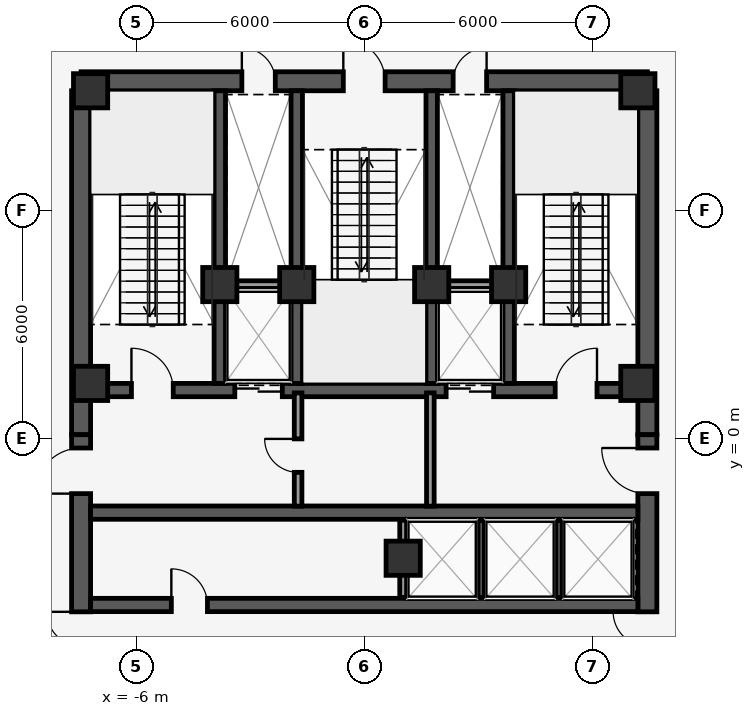
"""IFC4 building model, lengths in metres.
Left out: names, types, materials, properties, quantities, classifications, styles, units other than length and angle.
Written with IfcOpenShell. Run it as: python <this file> out.ifc"""

import sys

from ifc_helpers import new_model, si_unit, direction, frame, frame_2d, origin, origin_2d, place, context, subcontext, project, spatial, rectangle, extrude, element, fill, save


model = new_model("IFC4")
c1 = context("Model", 3, precision=1e-05, world=origin(), true_north=direction((0.0, 1.0)))
c2 = subcontext(c1, "Body", "Model", "MODEL_VIEW")
j1 = project(units=[si_unit("LENGTHUNIT", "METRE"), si_unit("PLANEANGLEUNIT", "RADIAN")], contexts=[c1])
p1 = place(None, origin())
s1 = spatial("IfcSite", under=j1, at=p1, CompositionType="ELEMENT")
p2 = place(p1, origin())
s2 = spatial("IfcBuilding", under=s1, at=p2, CompositionType="ELEMENT")
p3 = place(p2, frame((0.0, 0.0, 318.8)))
s3 = spatial("IfcBuildingStorey", under=s2, at=p3, CompositionType="ELEMENT", Elevation=318.8)
p4 = place(p3, frame((-7.45, 9.4, 0.0), z_axis=(0.0, 0.0, 1.0), x_axis=(1.0, 0.0, 0.0)))
e1 = element("IfcWall", 1, at=p4, inside=s3, PredefinedType="SHEAR", context=c2, shape_type="SweptSolid", body=[
    extrude(rectangle(XDim=14.9, YDim=0.5, at=frame_2d((7.45, 0.0))), origin(), (0.0, 0.0, 1.0), 4.32),
])
p5 = place(p4, frame((6.9, 0.0, 0.0)))
e2 = element("IfcOpeningElement", 2, at=p5, cuts=e1, PredefinedType="OPENING", context=c2, shape_type="SweptSolid", body=[
    extrude(rectangle(XDim=1.1, YDim=2.15, at=frame_2d((0.55, 1.075))), frame((0.0, 0.26, 0.0), z_axis=(0.0, -1.0, 0.0), x_axis=(1.0, 0.0, 0.0)), (0.0, 0.0, 1.0), 0.52),
])
p6 = place(p4, frame((4.23, 0.0, 0.0)))
e3 = element("IfcOpeningElement", 3, at=p6, cuts=e1, PredefinedType="OPENING", context=c2, shape_type="SweptSolid", body=[
    extrude(rectangle(XDim=0.88, YDim=2.15, at=frame_2d((0.44, 1.075))), frame((0.0, 0.26, 0.0), z_axis=(0.0, -1.0, 0.0), x_axis=(1.0, 0.0, 0.0)), (0.0, 0.0, 1.0), 0.52),
])
p7 = place(p4, frame((9.79, 0.0, 0.0)))
e4 = element("IfcOpeningElement", 4, at=p7, cuts=e1, PredefinedType="OPENING", context=c2, shape_type="SweptSolid", body=[
    extrude(rectangle(XDim=0.88, YDim=2.15, at=frame_2d((0.44, 1.075))), frame((0.0, 0.26, 0.0), z_axis=(0.0, -1.0, 0.0), x_axis=(1.0, 0.0, 0.0)), (0.0, 0.0, 1.0), 0.52),
])
p8 = place(p3, frame((-7.2, 1.275, 0.0), z_axis=(0.0, 0.0, 1.0), x_axis=(1.0, 0.0, 0.0)))
e5 = element("IfcWall", 5, at=p8, inside=s3, PredefinedType="SHEAR", context=c2, shape_type="SweptSolid", body=[
    extrude(rectangle(XDim=14.4, YDim=0.35, at=frame_2d((7.2, 0.0))), origin(), (0.0, 0.0, 1.0), 4.32),
])
p9 = place(p8, frame((3.795, 0.0, 0.0)))
e6 = element("IfcOpeningElement", 6, at=p9, cuts=e5, PredefinedType="OPENING", context=c2, shape_type="SweptSolid", body=[
    extrude(rectangle(XDim=1.25, YDim=2.25, at=frame_2d((0.625, 1.125))), frame((0.0, 0.185, 0.0), z_axis=(0.0, -1.0, 0.0), x_axis=(1.0, 0.0, 0.0)), (0.0, 0.0, 1.0), 0.37),
])
p10 = place(p8, frame((9.355, 0.0, 0.0)))
e7 = element("IfcOpeningElement", 7, at=p10, cuts=e5, PredefinedType="OPENING", context=c2, shape_type="SweptSolid", body=[
    extrude(rectangle(XDim=1.25, YDim=2.25, at=frame_2d((0.625, 1.125))), frame((0.0, 0.185, 0.0), z_axis=(0.0, -1.0, 0.0), x_axis=(1.0, 0.0, 0.0)), (0.0, 0.0, 1.0), 0.37),
])
p11 = place(p8, frame((1.075, 0.0, 0.0)))
e8 = element("IfcOpeningElement", 8, at=p11, cuts=e5, PredefinedType="OPENING", context=c2, shape_type="SweptSolid", body=[
    extrude(rectangle(XDim=1.1, YDim=2.15, at=frame_2d((0.55, 1.075))), frame((0.0, 0.185, 0.0), z_axis=(0.0, -1.0, 0.0), x_axis=(1.0, 0.0, 0.0)), (0.0, 0.0, 1.0), 0.37),
])
p12 = place(p8, frame((12.225, 0.0, 0.0)))
e9 = element("IfcOpeningElement", 9, at=p12, cuts=e5, PredefinedType="OPENING", context=c2, shape_type="SweptSolid", body=[
    extrude(rectangle(XDim=1.1, YDim=2.15, at=frame_2d((0.55, 1.075))), frame((0.0, 0.185, 0.0), z_axis=(0.0, -1.0, 0.0), x_axis=(1.0, 0.0, 0.0)), (0.0, 0.0, 1.0), 0.37),
])
for number, where, z_axis, x_axis in (
    (10, (-3.8, 1.45, 0.0), (0.0, 0.0, 1.0), (0.0, 1.0, 0.0)),
    (11, (-1.775, 1.45, 0.0), (0.0, 0.0, 1.0), (0.0, 1.0, 0.0)),
    (12, (1.775, 1.45, 0.0), (0.0, 0.0, 1.0), (0.0, 1.0, 0.0)),
    (13, (3.8, 1.45, 0.0), (0.0, 0.0, 1.0), (0.0, 1.0, 0.0)),
):
    element("IfcWall", number, at=place(p3, frame(where, z_axis=z_axis, x_axis=x_axis)), inside=s3, PredefinedType="SHEAR", context=c2, shape_type="SweptSolid", body=[
        extrude(rectangle(XDim=7.7, YDim=0.3, at=frame_2d((3.85, 0.0))), origin(), (0.0, 0.0, 1.0), 4.32),
    ])
for number, where, z_axis, x_axis in (
    (14, (-7.45, 0.1, 0.0), (0.0, 0.0, 1.0), (0.0, 1.0, 0.0)),
    (15, (7.45, 0.1, 0.0), (0.0, 0.0, 1.0), (0.0, 1.0, 0.0)),
):
    element("IfcWall", number, at=place(p3, frame(where, z_axis=z_axis, x_axis=x_axis)), inside=s3, PredefinedType="SHEAR", context=c2, shape_type="SweptSolid", body=[
        extrude(rectangle(XDim=9.05, YDim=0.5, at=frame_2d((4.525, 0.0))), origin(), (0.0, 0.0, 1.0), 4.32),
    ])
p13 = place(p3, frame((-7.45, -9.0, 0.0), z_axis=(0.0, 0.0, 1.0), x_axis=(0.0, 1.0, 0.0)))
e16 = element("IfcWall", 16, at=p13, inside=s3, PredefinedType="SHEAR", context=c2, shape_type="SweptSolid", body=[
    extrude(rectangle(XDim=9.1, YDim=0.5, at=frame_2d((4.55, 0.0))), origin(), (0.0, 0.0, 1.0), 4.32),
])
p14 = place(p13, frame((2.64, 0.0, 0.0)))
e17 = element("IfcOpeningElement", 17, at=p14, cuts=e16, PredefinedType="OPENING", context=c2, shape_type="SweptSolid", body=[
    extrude(rectangle(XDim=1.8, YDim=2.2, at=frame_2d((0.9, 1.1))), frame((0.0, 0.26, 0.0), z_axis=(0.0, -1.0, 0.0), x_axis=(1.0, 0.0, 0.0)), (0.0, 0.0, 1.0), 0.52),
])
p15 = place(p13, frame((7.55, 0.0, 0.0)))
e18 = element("IfcOpeningElement", 18, at=p15, cuts=e16, PredefinedType="OPENING", context=c2, shape_type="SweptSolid", body=[
    extrude(rectangle(XDim=1.2, YDim=2.15, at=frame_2d((0.6, 1.075))), frame((0.0, 0.26, 0.0), z_axis=(0.0, -1.0, 0.0), x_axis=(1.0, 0.0, 0.0)), (0.0, 0.0, 1.0), 0.52),
])
p16 = place(p3, frame((7.45, -9.0, 0.0), z_axis=(0.0, 0.0, 1.0), x_axis=(0.0, 1.0, 0.0)))
e19 = element("IfcWall", 19, at=p16, inside=s3, PredefinedType="SHEAR", context=c2, shape_type="SweptSolid", body=[
    extrude(rectangle(XDim=9.1, YDim=0.5, at=frame_2d((4.55, 0.0))), origin(), (0.0, 0.0, 1.0), 4.32),
])
p17 = place(p16, frame((2.64, 0.0, 0.0)))
e20 = element("IfcOpeningElement", 20, at=p17, cuts=e19, PredefinedType="OPENING", context=c2, shape_type="SweptSolid", body=[
    extrude(rectangle(XDim=1.8, YDim=2.2, at=frame_2d((0.9, 1.1))), frame((0.0, 0.26, 0.0), z_axis=(0.0, -1.0, 0.0), x_axis=(1.0, 0.0, 0.0)), (0.0, 0.0, 1.0), 0.52),
])
p18 = place(p16, frame((7.55, 0.0, 0.0)))
e21 = element("IfcOpeningElement", 21, at=p18, cuts=e19, PredefinedType="OPENING", context=c2, shape_type="SweptSolid", body=[
    extrude(rectangle(XDim=1.2, YDim=2.15, at=frame_2d((0.6, 1.075))), frame((0.0, 0.26, 0.0), z_axis=(0.0, -1.0, 0.0), x_axis=(1.0, 0.0, 0.0)), (0.0, 0.0, 1.0), 0.52),
])
p19 = place(p3, frame((-7.2, -1.95, 0.0), z_axis=(0.0, 0.0, 1.0), x_axis=(1.0, 0.0, 0.0)))
e22 = element("IfcWall", 22, at=p19, inside=s3, PredefinedType="SHEAR", context=c2, shape_type="SweptSolid", body=[
    extrude(rectangle(XDim=14.4, YDim=0.35, at=frame_2d((7.2, 0.0))), origin(), (0.0, 0.0, 1.0), 4.32),
])
p20 = place(p3, frame((-7.2, -4.38, 0.0), z_axis=(0.0, 0.0, 1.0), x_axis=(1.0, 0.0, 0.0)))
e23 = element("IfcWall", 23, at=p20, inside=s3, PredefinedType="SHEAR", context=c2, shape_type="SweptSolid", body=[
    extrude(rectangle(XDim=14.4, YDim=0.35, at=frame_2d((7.2, 0.0))), origin(), (0.0, 0.0, 1.0), 4.32),
])
p21 = place(p20, frame((2.125, 0.0, 0.0)))
e24 = element("IfcOpeningElement", 24, at=p21, cuts=e23, PredefinedType="OPENING", context=c2, shape_type="SweptSolid", body=[
    extrude(rectangle(XDim=0.95, YDim=2.15, at=frame_2d((0.475, 1.075))), frame((0.0, 0.185, 0.0), z_axis=(0.0, -1.0, 0.0), x_axis=(1.0, 0.0, 0.0)), (0.0, 0.0, 1.0), 0.37),
])
for number, where, z_axis, x_axis in (
    (25, (7.2, 1.45, 0.0), (0.0, 0.0, 1.0), (1.0, 0.0, 0.0)),
    (26, (7.2, 9.15, 0.0), (0.0, 0.0, 1.0), (1.0, 0.0, 0.0)),
    (27, (-7.2, 9.15, 0.0), (0.0, 0.0, 1.0), (1.0, 0.0, 0.0)),
    (28, (-7.2, 1.45, 0.0), (0.0, 0.0, 1.0), (1.0, 0.0, 0.0)),
    (29, (-3.8, 4.05, 0.0), (0.0, 0.0, 1.0), (1.0, 0.0, 0.0)),
    (30, (3.8, 4.05, 0.0), (0.0, 0.0, 1.0), (1.0, 0.0, 0.0)),
    (31, (-1.775, 4.05, 0.0), (0.0, 0.0, 1.0), (1.0, 0.0, 0.0)),
    (32, (1.775, 4.05, 0.0), (0.0, 0.0, 1.0), (1.0, 0.0, 0.0)),
    (33, (1.025, -3.15, 0.0), (0.0, 0.0, 1.0), (1.0, 0.0, 0.0)),
):
    element("IfcColumn", number, at=place(p3, frame(where, z_axis=z_axis, x_axis=x_axis)), inside=s3, PredefinedType="COLUMN", context=c2, shape_type="SweptSolid", body=[
        extrude(rectangle(XDim=0.9, YDim=0.9, at=origin_2d()), origin(), (0.0, 0.0, 1.0), 4.6),
    ])
p22 = place(p3, frame((25.8, 9.083, 0.0), z_axis=(0.0, 0.0, 1.0), x_axis=(-0.55919392155, -0.829036885851, 0.0)))
e34 = element("IfcWall", 34, at=p22, inside=s3, PredefinedType="STANDARD", context=c2, shape_type="SweptSolid", body=[
    extrude(rectangle(XDim=43.915, YDim=0.28, at=frame_2d((21.958, 0.0))), origin(), (0.0, 0.0, 1.0), 4.32),
])
p23 = place(p22, frame((21.457, 0.0, 0.0)))
e35 = element("IfcOpeningElement", 35, at=p23, cuts=e34, PredefinedType="OPENING", context=c2, shape_type="SweptSolid", body=[
    extrude(rectangle(XDim=1.0, YDim=2.15, at=frame_2d((0.5, 1.075))), frame((0.0, 0.15, 0.0), z_axis=(0.0, -1.0, 0.0), x_axis=(1.0, 0.0, 0.0)), (0.0, 0.0, 1.0), 0.3),
])
p24 = place(p22, frame((4.257, 0.0, 0.85)))
e36 = element("IfcOpeningElement", 36, at=p24, cuts=e34, PredefinedType="OPENING", context=c2, shape_type="SweptSolid", body=[
    extrude(rectangle(XDim=1.8, YDim=2.4, at=frame_2d((0.9, 1.2))), frame((0.0, 0.15, 0.0), z_axis=(0.0, -1.0, 0.0), x_axis=(1.0, 0.0, 0.0)), (0.0, 0.0, 1.0), 0.3),
])
p25 = place(p22, frame((9.857, 0.0, 0.85)))
e37 = element("IfcOpeningElement", 37, at=p25, cuts=e34, PredefinedType="OPENING", context=c2, shape_type="SweptSolid", body=[
    extrude(rectangle(XDim=1.8, YDim=2.4, at=frame_2d((0.9, 1.2))), frame((0.0, 0.15, 0.0), z_axis=(0.0, -1.0, 0.0), x_axis=(1.0, 0.0, 0.0)), (0.0, 0.0, 1.0), 0.3),
])
p26 = place(p22, frame((32.257, 0.0, 0.85)))
e38 = element("IfcOpeningElement", 38, at=p26, cuts=e34, PredefinedType="OPENING", context=c2, shape_type="SweptSolid", body=[
    extrude(rectangle(XDim=1.8, YDim=2.4, at=frame_2d((0.9, 1.2))), frame((0.0, 0.15, 0.0), z_axis=(0.0, -1.0, 0.0), x_axis=(1.0, 0.0, 0.0)), (0.0, 0.0, 1.0), 0.3),
])
p27 = place(p22, frame((37.857, 0.0, 0.85)))
e39 = element("IfcOpeningElement", 39, at=p27, cuts=e34, PredefinedType="OPENING", context=c2, shape_type="SweptSolid", body=[
    extrude(rectangle(XDim=1.8, YDim=2.4, at=frame_2d((0.9, 1.2))), frame((0.0, 0.15, 0.0), z_axis=(0.0, -1.0, 0.0), x_axis=(1.0, 0.0, 0.0)), (0.0, 0.0, 1.0), 0.3),
])
p28 = place(p3, frame((-4.988, -26.865, 0.0), z_axis=(0.0, 0.0, 1.0), x_axis=(-0.431592936847, 0.902068476815, 0.0)))
e40 = element("IfcWall", 40, at=p28, inside=s3, PredefinedType="STANDARD", context=c2, shape_type="SweptSolid", body=[
    extrude(rectangle(XDim=43.18, YDim=0.28, at=frame_2d((21.59, 0.0))), origin(), (0.0, 0.0, 1.0), 4.32),
])
p29 = place(p28, frame((18.499, 0.0, 0.0)))
e41 = element("IfcOpeningElement", 41, at=p29, cuts=e40, PredefinedType="OPENING", context=c2, shape_type="SweptSolid", body=[
    extrude(rectangle(XDim=1.0, YDim=2.15, at=frame_2d((0.5, 1.075))), frame((0.0, 0.15, 0.0), z_axis=(0.0, -1.0, 0.0), x_axis=(1.0, 0.0, 0.0)), (0.0, 0.0, 1.0), 0.3),
])
p30 = place(p28, frame((9.49, 0.0, 0.85)))
e42 = element("IfcOpeningElement", 42, at=p30, cuts=e40, PredefinedType="OPENING", context=c2, shape_type="SweptSolid", body=[
    extrude(rectangle(XDim=1.8, YDim=2.4, at=frame_2d((0.9, 1.2))), frame((0.0, 0.15, 0.0), z_axis=(0.0, -1.0, 0.0), x_axis=(1.0, 0.0, 0.0)), (0.0, 0.0, 1.0), 0.3),
])
p31 = place(p28, frame((31.89, 0.0, 0.85)))
e43 = element("IfcOpeningElement", 43, at=p31, cuts=e40, PredefinedType="OPENING", context=c2, shape_type="SweptSolid", body=[
    extrude(rectangle(XDim=1.8, YDim=2.4, at=frame_2d((0.9, 1.2))), frame((0.0, 0.15, 0.0), z_axis=(0.0, -1.0, 0.0), x_axis=(1.0, 0.0, 0.0)), (0.0, 0.0, 1.0), 0.3),
])
p32 = place(p28, frame((37.49, 0.0, 0.85)))
e44 = element("IfcOpeningElement", 44, at=p32, cuts=e40, PredefinedType="OPENING", context=c2, shape_type="SweptSolid", body=[
    extrude(rectangle(XDim=1.8, YDim=2.4, at=frame_2d((0.9, 1.2))), frame((0.0, 0.15, 0.0), z_axis=(0.0, -1.0, 0.0), x_axis=(1.0, 0.0, 0.0)), (0.0, 0.0, 1.0), 0.3),
])
for number, where, z_axis, x_axis in (
    (45, (-3.65, 4.05, 0.0), (0.0, 0.0, 1.0), (1.0, 0.0, 0.0)),
    (46, (1.92, 4.05, 0.0), (0.0, 0.0, 1.0), (1.0, 0.0, 0.0)),
):
    element("IfcWall", number, at=place(p3, frame(where, z_axis=z_axis, x_axis=x_axis)), inside=s3, PredefinedType="PARTITIONING", context=c2, shape_type="SweptSolid", body=[
        extrude(rectangle(XDim=1.73, YDim=0.2, at=frame_2d((0.865, 0.0))), origin(), (0.0, 0.0, 1.0), 4.32),
    ])
p33 = place(p3, frame((1.025, -4.18, 0.0), z_axis=(0.0, 0.0, 1.0), x_axis=(0.0, 1.0, 0.0)))
e47 = element("IfcWall", 47, at=p33, inside=s3, PredefinedType="PARTITIONING", context=c2, shape_type="SweptSolid", body=[
    extrude(rectangle(XDim=2.03, YDim=0.18, at=frame_2d((1.015, 0.0))), origin(), (0.0, 0.0, 1.0), 3.368),
])
for number, where, z_axis, x_axis in (
    (48, (3.075, -4.18, 0.0), (0.0, 0.0, 1.0), (0.0, 1.0, 0.0)),
    (49, (5.125, -4.18, 0.0), (0.0, 0.0, 1.0), (0.0, 1.0, 0.0)),
):
    element("IfcWall", number, at=place(p3, frame(where, z_axis=z_axis, x_axis=x_axis)), inside=s3, PredefinedType="PARTITIONING", context=c2, shape_type="SweptSolid", body=[
        extrude(rectangle(XDim=2.03, YDim=0.15, at=frame_2d((1.015, 0.0))), origin(), (0.0, 0.0, 1.0), 4.32),
    ])
p34 = place(p3, frame((-1.74, -1.78, 0.0), z_axis=(0.0, 0.0, 1.0), x_axis=(0.0, 1.0, 0.0)))
e50 = element("IfcWall", 50, at=p34, inside=s3, PredefinedType="PARTITIONING", context=c2, shape_type="SweptSolid", body=[
    extrude(rectangle(XDim=2.98, YDim=0.2, at=frame_2d((1.49, 0.0))), origin(), (0.0, 0.0, 1.0), 4.32),
])
p35 = place(p34, frame((0.89, 0.0, 0.0)))
e51 = element("IfcOpeningElement", 51, at=p35, cuts=e50, PredefinedType="OPENING", context=c2, shape_type="SweptSolid", body=[
    extrude(rectangle(XDim=0.88, YDim=2.15, at=frame_2d((0.44, 1.075))), frame((0.0, 0.11, 0.0), z_axis=(0.0, -1.0, 0.0), x_axis=(1.0, 0.0, 0.0)), (0.0, 0.0, 1.0), 0.22),
])
p36 = place(p3, frame((1.74, -1.78, 0.0), z_axis=(0.0, 0.0, 1.0), x_axis=(0.0, 1.0, 0.0)))
e52 = element("IfcWall", 52, at=p36, inside=s3, PredefinedType="PARTITIONING", context=c2, shape_type="SweptSolid", body=[
    extrude(rectangle(XDim=2.98, YDim=0.2, at=frame_2d((1.49, 0.0))), origin(), (0.0, 0.0, 1.0), 4.32),
])
p37 = place(p9, origin())
e53 = element("IfcDoor", 53, at=p37, inside=s3, OperationType="DOUBLE_DOOR_SLIDING", PredefinedType="DOOR", context=c2, shape_type="SweptSolid", body=[
    extrude(rectangle(XDim=1.25, YDim=2.25, at=frame_2d((0.625, 1.125))), frame((0.0, 0.025, 0.0), z_axis=(0.0, -1.0, 0.0), x_axis=(1.0, 0.0, 0.0)), (0.0, 0.0, 1.0), 0.05),
])
fill(e6, e53)
p38 = place(p10, origin())
e54 = element("IfcDoor", 54, at=p38, inside=s3, OperationType="DOUBLE_DOOR_SLIDING", PredefinedType="DOOR", context=c2, shape_type="SweptSolid", body=[
    extrude(rectangle(XDim=1.25, YDim=2.25, at=frame_2d((0.625, 1.125))), frame((0.0, 0.025, 0.0), z_axis=(0.0, -1.0, 0.0), x_axis=(1.0, 0.0, 0.0)), (0.0, 0.0, 1.0), 0.05),
])
fill(e7, e54)
p39 = place(p11, origin())
e55 = element("IfcDoor", 55, at=p39, inside=s3, OperationType="SINGLE_SWING_LEFT", PredefinedType="DOOR", context=c2, shape_type="SweptSolid", body=[
    extrude(rectangle(XDim=1.1, YDim=2.15, at=frame_2d((0.55, 1.075))), frame((0.0, 0.025, 0.0), z_axis=(0.0, -1.0, 0.0), x_axis=(1.0, 0.0, 0.0)), (0.0, 0.0, 1.0), 0.05),
])
fill(e8, e55)
p40 = place(p12, origin())
e56 = element("IfcDoor", 56, at=p40, inside=s3, OperationType="SINGLE_SWING_RIGHT", PredefinedType="DOOR", context=c2, shape_type="SweptSolid", body=[
    extrude(rectangle(XDim=1.1, YDim=2.15, at=frame_2d((0.55, 1.075))), frame((0.0, 0.025, 0.0), z_axis=(0.0, -1.0, 0.0), x_axis=(1.0, 0.0, 0.0)), (0.0, 0.0, 1.0), 0.05),
])
fill(e9, e56)
p41 = place(p5, origin())
e57 = element("IfcDoor", 57, at=p41, inside=s3, OperationType="SINGLE_SWING_LEFT", PredefinedType="DOOR", context=c2, shape_type="SweptSolid", body=[
    extrude(rectangle(XDim=1.1, YDim=2.15, at=frame_2d((0.55, 1.075))), frame((0.0, 0.025, 0.0), z_axis=(0.0, -1.0, 0.0), x_axis=(1.0, 0.0, 0.0)), (0.0, 0.0, 1.0), 0.05),
])
fill(e2, e57)
p42 = place(p6, origin())
e58 = element("IfcDoor", 58, at=p42, inside=s3, OperationType="SINGLE_SWING_LEFT", PredefinedType="DOOR", context=c2, shape_type="SweptSolid", body=[
    extrude(rectangle(XDim=0.88, YDim=2.15, at=frame_2d((0.44, 1.075))), frame((0.0, 0.025, 0.0), z_axis=(0.0, -1.0, 0.0), x_axis=(1.0, 0.0, 0.0)), (0.0, 0.0, 1.0), 0.05),
])
fill(e3, e58)
p43 = place(p7, origin())
e59 = element("IfcDoor", 59, at=p43, inside=s3, OperationType="SINGLE_SWING_RIGHT", PredefinedType="DOOR", context=c2, shape_type="SweptSolid", body=[
    extrude(rectangle(XDim=0.88, YDim=2.15, at=frame_2d((0.44, 1.075))), frame((0.0, 0.025, 0.0), z_axis=(0.0, -1.0, 0.0), x_axis=(1.0, 0.0, 0.0)), (0.0, 0.0, 1.0), 0.05),
])
fill(e4, e59)
p44 = place(p14, origin())
e60 = element("IfcDoor", 60, at=p44, inside=s3, OperationType="DOUBLE_DOOR_SINGLE_SWING", PredefinedType="DOOR", context=c2, shape_type="SweptSolid", body=[
    extrude(rectangle(XDim=1.8, YDim=2.2, at=frame_2d((0.9, 1.1))), frame((0.0, 0.025, 0.0), z_axis=(0.0, -1.0, 0.0), x_axis=(1.0, 0.0, 0.0)), (0.0, 0.0, 1.0), 0.05),
])
fill(e17, e60)
p45 = place(p15, origin())
e61 = element("IfcDoor", 61, at=p45, inside=s3, OperationType="SINGLE_SWING_LEFT", PredefinedType="DOOR", context=c2, shape_type="SweptSolid", body=[
    extrude(rectangle(XDim=1.2, YDim=2.15, at=frame_2d((0.6, 1.075))), frame((0.0, 0.025, 0.0), z_axis=(0.0, -1.0, 0.0), x_axis=(1.0, 0.0, 0.0)), (0.0, 0.0, 1.0), 0.05),
])
fill(e18, e61)
p46 = place(p17, origin())
e62 = element("IfcDoor", 62, at=p46, inside=s3, OperationType="DOUBLE_DOOR_SINGLE_SWING", PredefinedType="DOOR", context=c2, shape_type="SweptSolid", body=[
    extrude(rectangle(XDim=1.8, YDim=2.2, at=frame_2d((0.9, 1.1))), frame((0.0, 0.025, 0.0), z_axis=(0.0, -1.0, 0.0), x_axis=(1.0, 0.0, 0.0)), (0.0, 0.0, 1.0), 0.05),
])
fill(e20, e62)
p47 = place(p18, origin())
e63 = element("IfcDoor", 63, at=p47, inside=s3, OperationType="SINGLE_SWING_RIGHT", PredefinedType="DOOR", context=c2, shape_type="SweptSolid", body=[
    extrude(rectangle(XDim=1.2, YDim=2.15, at=frame_2d((0.6, 1.075))), frame((0.0, 0.025, 0.0), z_axis=(0.0, -1.0, 0.0), x_axis=(1.0, 0.0, 0.0)), (0.0, 0.0, 1.0), 0.05),
])
fill(e21, e63)
p48 = place(p21, origin())
e64 = element("IfcDoor", 64, at=p48, inside=s3, OperationType="SINGLE_SWING_LEFT", PredefinedType="DOOR", context=c2, shape_type="SweptSolid", body=[
    extrude(rectangle(XDim=0.95, YDim=2.15, at=frame_2d((0.475, 1.075))), frame((0.0, 0.025, 0.0), z_axis=(0.0, -1.0, 0.0), x_axis=(1.0, 0.0, 0.0)), (0.0, 0.0, 1.0), 0.05),
])
fill(e24, e64)
p49 = place(p35, origin())
e65 = element("IfcDoor", 65, at=p49, inside=s3, OperationType="SINGLE_SWING_RIGHT", PredefinedType="DOOR", context=c2, shape_type="SweptSolid", body=[
    extrude(rectangle(XDim=0.88, YDim=2.15, at=frame_2d((0.44, 1.075))), frame((0.0, 0.025, 0.0), z_axis=(0.0, -1.0, 0.0), x_axis=(1.0, 0.0, 0.0)), (0.0, 0.0, 1.0), 0.05),
])
fill(e51, e65)
save(model, sys.argv[1])
